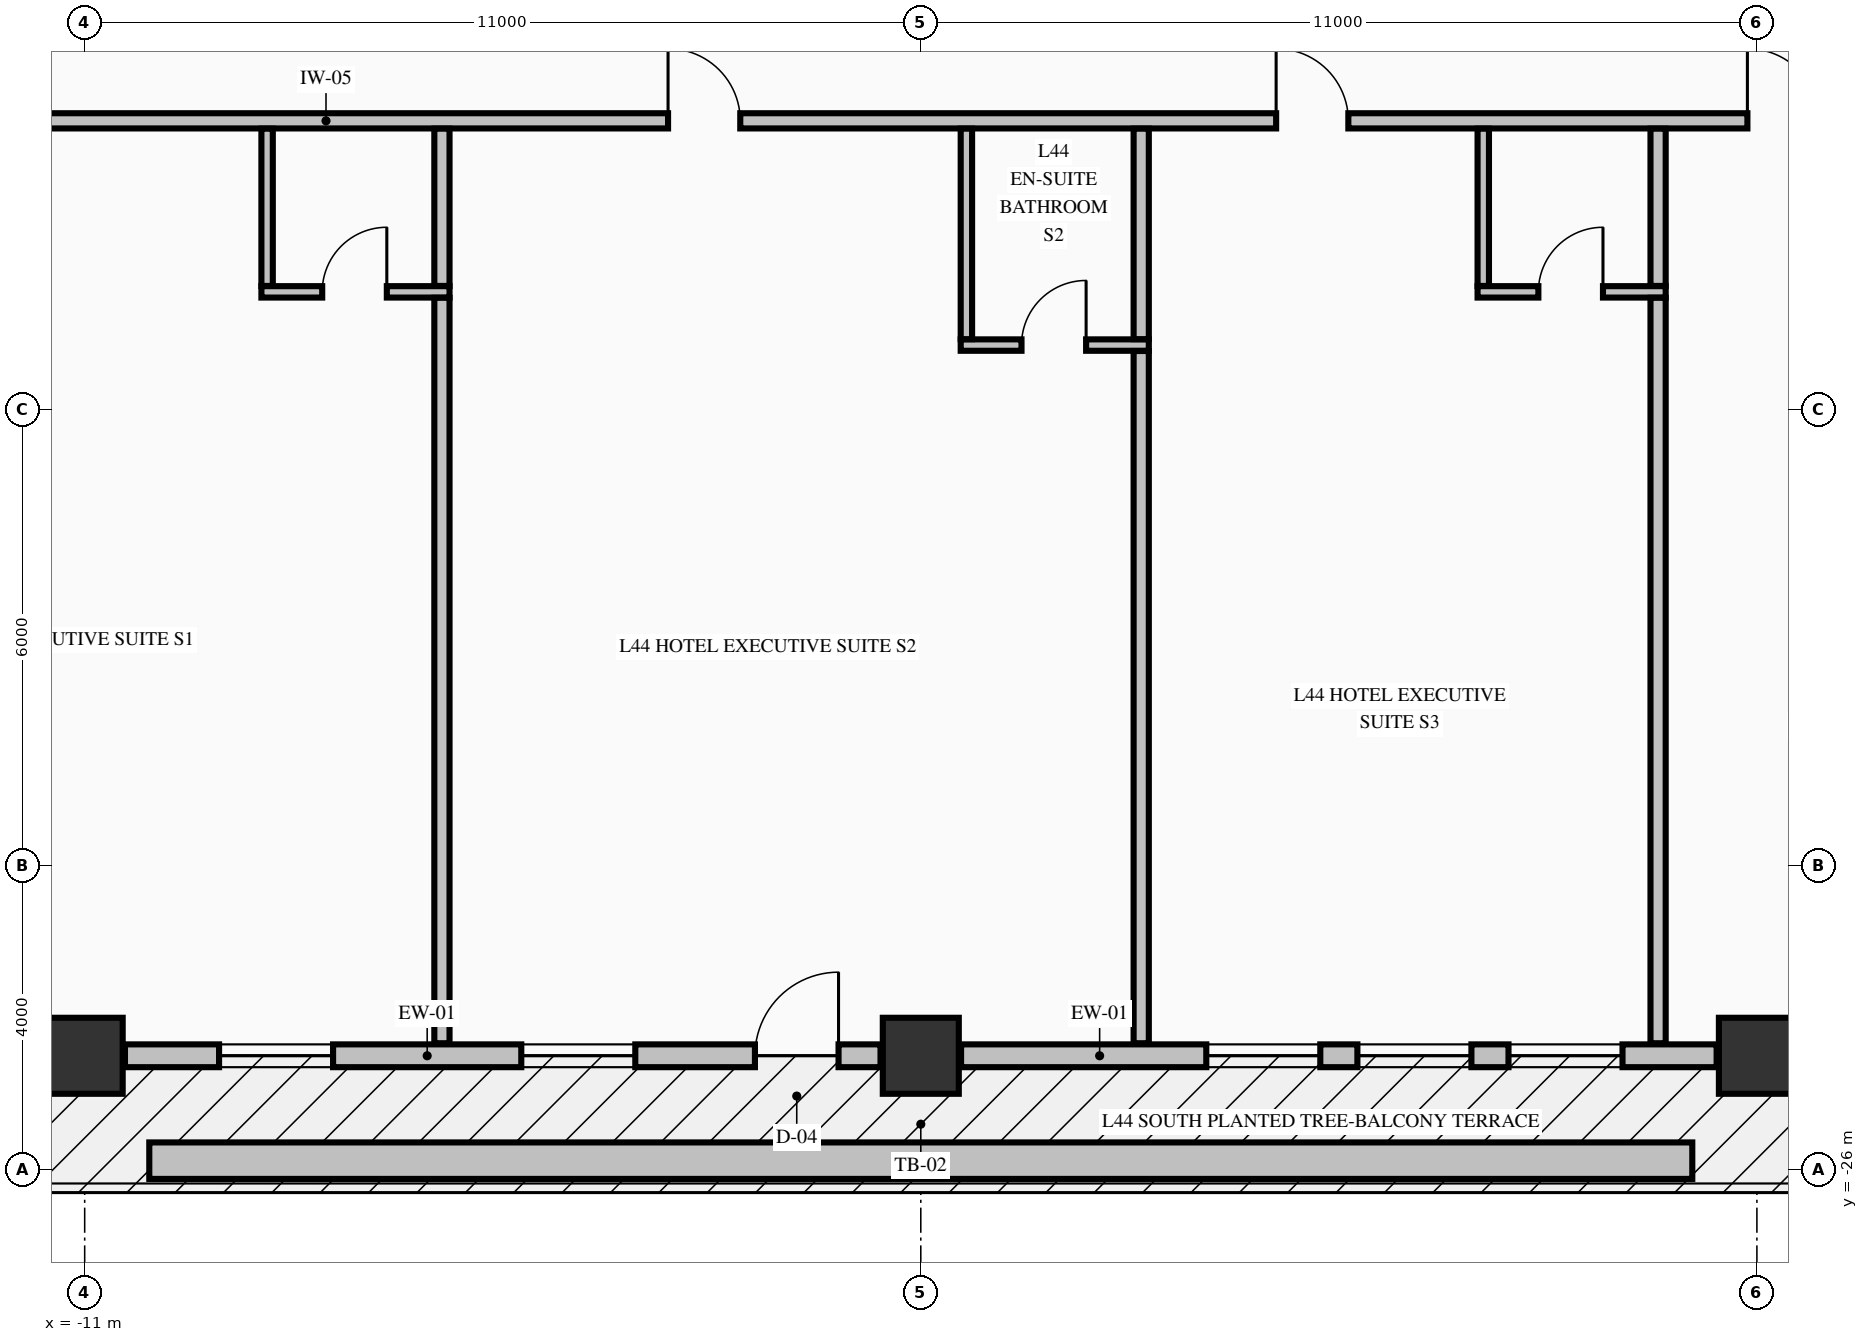
"""IFC4 building model, lengths in metres.
Left out: names, types, materials, properties, quantities, classifications, styles, units other than length and angle.
Written with IfcOpenShell. Run it as: python <this file> out.ifc"""

import sys

from ifc_helpers import new_model, si_unit, direction, frame, frame_2d, origin, origin_2d, place, context, subcontext, project, spatial, rectangle, extrude, element, fill, save


model = new_model("IFC4")
c1 = context("Model", 3, precision=1e-05, world=origin(), true_north=direction((0.0, 1.0)))
c2 = subcontext(c1, "Body", "Model", "MODEL_VIEW")
j1 = project(units=[si_unit("LENGTHUNIT", "METRE"), si_unit("PLANEANGLEUNIT", "RADIAN")], contexts=[c1])
p1 = place(None, origin())
s1 = spatial("IfcSite", under=j1, at=p1, CompositionType="ELEMENT")
p2 = place(p1, origin())
s2 = spatial("IfcBuilding", under=s1, at=p2, CompositionType="ELEMENT")
p3 = place(p2, frame((0.0, 0.0, 172.86)))
s3 = spatial("IfcBuildingStorey", under=s2, at=p3, CompositionType="ELEMENT", Elevation=172.86)
for number, where, z_axis, x_axis in (
    (1, (-11.0, -24.5, -0.25), (0.0, 0.0, 1.0), (1.0, 0.0, 0.0)),
    (2, (0.0, -24.5, -0.25), (0.0, 0.0, 1.0), (1.0, 0.0, 0.0)),
    (3, (11.0, -24.5, -0.25), (0.0, 0.0, 1.0), (1.0, 0.0, 0.0)),
):
    element("IfcColumn", number, at=place(p3, frame(where, z_axis=z_axis, x_axis=x_axis)), inside=s3, PredefinedType="COLUMN", context=c2, shape_type="SweptSolid", body=[
        extrude(rectangle(XDim=1.0, YDim=1.0, at=origin_2d()), origin(), (0.0, 0.0, 1.0), 3.375),
    ])
p4 = place(p3, frame((-10.47, -24.5, 0.0), z_axis=(0.0, 0.0, 1.0), x_axis=(1.0, 0.0, 0.0)))
e4 = element("IfcWall", 4, at=p4, inside=s3, PredefinedType="STANDARD", context=c2, shape_type="SweptSolid", body=[
    extrude(rectangle(XDim=9.94, YDim=0.3, at=frame_2d((4.97, 0.0))), origin(), (0.0, 0.0, 1.0), 2.517),
])
p5 = place(p4, frame((8.288, 0.0, 0.0)))
e5 = element("IfcOpeningElement", 5, at=p5, cuts=e4, PredefinedType="OPENING", context=c2, shape_type="SweptSolid", body=[
    extrude(rectangle(XDim=1.1, YDim=2.15, at=frame_2d((0.55, 1.075))), frame((0.0, 0.16, 0.0), z_axis=(0.0, -1.0, 0.0), x_axis=(1.0, 0.0, 0.0)), (0.0, 0.0, 1.0), 0.32),
])
p6 = place(p4, frame((1.238, 0.0, 0.72)))
e6 = element("IfcOpeningElement", 6, at=p6, cuts=e4, PredefinedType="OPENING", context=c2, shape_type="SweptSolid", body=[
    extrude(rectangle(XDim=1.5, YDim=1.6, at=frame_2d((0.75, 0.8))), frame((0.0, 0.16, 0.0), z_axis=(0.0, -1.0, 0.0), x_axis=(1.0, 0.0, 0.0)), (0.0, 0.0, 1.0), 0.32),
])
p7 = place(p4, frame((5.214, 0.0, 0.72)))
e7 = element("IfcOpeningElement", 7, at=p7, cuts=e4, PredefinedType="OPENING", context=c2, shape_type="SweptSolid", body=[
    extrude(rectangle(XDim=1.5, YDim=1.6, at=frame_2d((0.75, 0.8))), frame((0.0, 0.16, 0.0), z_axis=(0.0, -1.0, 0.0), x_axis=(1.0, 0.0, 0.0)), (0.0, 0.0, 1.0), 0.32),
])
p8 = place(p3, frame((0.53, -24.5, 0.0), z_axis=(0.0, 0.0, 1.0), x_axis=(1.0, 0.0, 0.0)))
e8 = element("IfcWall", 8, at=p8, inside=s3, PredefinedType="STANDARD", context=c2, shape_type="SweptSolid", body=[
    extrude(rectangle(XDim=9.94, YDim=0.3, at=frame_2d((4.97, 0.0))), origin(), (0.0, 0.0, 1.0), 2.517),
])
p9 = place(p8, frame((3.226, 0.0, 0.72)))
e9 = element("IfcOpeningElement", 9, at=p9, cuts=e8, PredefinedType="OPENING", context=c2, shape_type="SweptSolid", body=[
    extrude(rectangle(XDim=1.5, YDim=1.6, at=frame_2d((0.75, 0.8))), frame((0.0, 0.16, 0.0), z_axis=(0.0, -1.0, 0.0), x_axis=(1.0, 0.0, 0.0)), (0.0, 0.0, 1.0), 0.32),
])
p10 = place(p8, frame((5.214, 0.0, 0.72)))
e10 = element("IfcOpeningElement", 10, at=p10, cuts=e8, PredefinedType="OPENING", context=c2, shape_type="SweptSolid", body=[
    extrude(rectangle(XDim=1.5, YDim=1.6, at=frame_2d((0.75, 0.8))), frame((0.0, 0.16, 0.0), z_axis=(0.0, -1.0, 0.0), x_axis=(1.0, 0.0, 0.0)), (0.0, 0.0, 1.0), 0.32),
])
p11 = place(p8, frame((7.202, 0.0, 0.72)))
e11 = element("IfcOpeningElement", 11, at=p11, cuts=e8, PredefinedType="OPENING", context=c2, shape_type="SweptSolid", body=[
    extrude(rectangle(XDim=1.5, YDim=1.6, at=frame_2d((0.75, 0.8))), frame((0.0, 0.16, 0.0), z_axis=(0.0, -1.0, 0.0), x_axis=(1.0, 0.0, 0.0)), (0.0, 0.0, 1.0), 0.32),
])
p12 = place(p3, frame((0.525, -15.15, 0.0), z_axis=(0.0, 0.0, 1.0), x_axis=(1.0, 0.0, 0.0)))
e12 = element("IfcWall", 12, at=p12, inside=s3, PredefinedType="PARTITIONING", context=c2, shape_type="SweptSolid", body=[
    extrude(rectangle(XDim=2.475, YDim=0.15, at=frame_2d((1.238, 0.0))), origin(), (0.0, 0.0, 1.0), 3.125),
])
p13 = place(p12, frame((0.8, 0.0, 0.0)))
e13 = element("IfcOpeningElement", 13, at=p13, cuts=e12, PredefinedType="OPENING", context=c2, shape_type="SweptSolid", body=[
    extrude(rectangle(XDim=0.85, YDim=2.1, at=frame_2d((0.425, 1.05))), frame((0.0, 0.085, 0.0), z_axis=(0.0, -1.0, 0.0), x_axis=(1.0, 0.0, 0.0)), (0.0, 0.0, 1.0), 0.17),
])
p14 = place(p3, frame((-8.675, -14.45, 0.0), z_axis=(0.0, 0.0, 1.0), x_axis=(1.0, 0.0, 0.0)))
e14 = element("IfcWall", 14, at=p14, inside=s3, PredefinedType="PARTITIONING", context=c2, shape_type="SweptSolid", body=[
    extrude(rectangle(XDim=2.475, YDim=0.15, at=frame_2d((1.238, 0.0))), origin(), (0.0, 0.0, 1.0), 2.665),
])
p15 = place(p14, frame((0.8, 0.0, 0.0)))
e15 = element("IfcOpeningElement", 15, at=p15, cuts=e14, PredefinedType="OPENING", context=c2, shape_type="SweptSolid", body=[
    extrude(rectangle(XDim=0.85, YDim=2.1, at=frame_2d((0.425, 1.05))), frame((0.0, 0.085, 0.0), z_axis=(0.0, -1.0, 0.0), x_axis=(1.0, 0.0, 0.0)), (0.0, 0.0, 1.0), 0.17),
])
p16 = place(p3, frame((7.325, -14.45, 0.0), z_axis=(0.0, 0.0, 1.0), x_axis=(1.0, 0.0, 0.0)))
e16 = element("IfcWall", 16, at=p16, inside=s3, PredefinedType="PARTITIONING", context=c2, shape_type="SweptSolid", body=[
    extrude(rectangle(XDim=2.475, YDim=0.15, at=frame_2d((1.238, 0.0))), origin(), (0.0, 0.0, 1.0), 2.665),
])
p17 = place(p16, frame((0.8, 0.0, 0.0)))
e17 = element("IfcOpeningElement", 17, at=p17, cuts=e16, PredefinedType="OPENING", context=c2, shape_type="SweptSolid", body=[
    extrude(rectangle(XDim=0.85, YDim=2.1, at=frame_2d((0.425, 1.05))), frame((0.0, 0.085, 0.0), z_axis=(0.0, -1.0, 0.0), x_axis=(1.0, 0.0, 0.0)), (0.0, 0.0, 1.0), 0.17),
])
p18 = place(p3, frame((-17.1, -12.2, 0.0), z_axis=(0.0, 0.0, 1.0), x_axis=(1.0, 0.0, 0.0)))
e18 = element("IfcWall", 18, at=p18, inside=s3, PredefinedType="PARTITIONING", context=c2, shape_type="SweptSolid", body=[
    extrude(rectangle(XDim=39.2, YDim=0.2, at=frame_2d((19.6, 0.0))), origin(), (0.0, 0.0, 1.0), 3.125),
])
p19 = place(p18, frame((3.825, 0.0, 0.0)))
e19 = element("IfcOpeningElement", 19, at=p19, cuts=e18, PredefinedType="OPENING", context=c2, shape_type="SweptSolid", body=[
    extrude(rectangle(XDim=0.95, YDim=2.15, at=frame_2d((0.475, 1.075))), frame((0.0, 0.11, 0.0), z_axis=(0.0, -1.0, 0.0), x_axis=(1.0, 0.0, 0.0)), (0.0, 0.0, 1.0), 0.22),
])
p20 = place(p18, frame((13.775, 0.0, 0.0)))
e20 = element("IfcOpeningElement", 20, at=p20, cuts=e18, PredefinedType="OPENING", context=c2, shape_type="SweptSolid", body=[
    extrude(rectangle(XDim=0.95, YDim=2.15, at=frame_2d((0.475, 1.075))), frame((0.0, 0.11, 0.0), z_axis=(0.0, -1.0, 0.0), x_axis=(1.0, 0.0, 0.0)), (0.0, 0.0, 1.0), 0.22),
])
p21 = place(p18, frame((21.775, 0.0, 0.0)))
e21 = element("IfcOpeningElement", 21, at=p21, cuts=e18, PredefinedType="OPENING", context=c2, shape_type="SweptSolid", body=[
    extrude(rectangle(XDim=0.95, YDim=2.15, at=frame_2d((0.475, 1.075))), frame((0.0, 0.11, 0.0), z_axis=(0.0, -1.0, 0.0), x_axis=(1.0, 0.0, 0.0)), (0.0, 0.0, 1.0), 0.22),
])
p22 = place(p18, frame((27.975, 0.0, 0.0)))
e22 = element("IfcOpeningElement", 22, at=p22, cuts=e18, PredefinedType="OPENING", context=c2, shape_type="SweptSolid", body=[
    extrude(rectangle(XDim=0.95, YDim=2.15, at=frame_2d((0.475, 1.075))), frame((0.0, 0.11, 0.0), z_axis=(0.0, -1.0, 0.0), x_axis=(1.0, 0.0, 0.0)), (0.0, 0.0, 1.0), 0.22),
])
p23 = place(p18, frame((34.325, 0.0, 0.0)))
e23 = element("IfcOpeningElement", 23, at=p23, cuts=e18, PredefinedType="OPENING", context=c2, shape_type="SweptSolid", body=[
    extrude(rectangle(XDim=0.95, YDim=2.15, at=frame_2d((0.475, 1.075))), frame((0.0, 0.11, 0.0), z_axis=(0.0, -1.0, 0.0), x_axis=(1.0, 0.0, 0.0)), (0.0, 0.0, 1.0), 0.22),
])
p24 = place(p3, frame((-8.6, -14.372, 0.0), z_axis=(0.0, 0.0, 1.0), x_axis=(0.0, 1.0, 0.0)))
e24 = element("IfcWall", 24, at=p24, inside=s3, PredefinedType="PARTITIONING", context=c2, shape_type="SweptSolid", body=[
    extrude(rectangle(XDim=2.069, YDim=0.15, at=frame_2d((1.035, 0.0))), origin(), (0.0, 0.0, 1.0), 3.125),
])
p25 = place(p3, frame((-6.3, -24.335, 0.0), z_axis=(0.0, 0.0, 1.0), x_axis=(0.0, 1.0, 0.0)))
e25 = element("IfcWall", 25, at=p25, inside=s3, PredefinedType="PARTITIONING", context=c2, shape_type="SweptSolid", body=[
    extrude(rectangle(XDim=9.807, YDim=0.2, at=frame_2d((4.903, 0.0))), origin(), (0.0, 0.0, 1.0), 3.125),
])
p26 = place(p3, frame((-6.3, -14.372, 0.0), z_axis=(0.0, 0.0, 1.0), x_axis=(0.0, 1.0, 0.0)))
e26 = element("IfcWall", 26, at=p26, inside=s3, PredefinedType="PARTITIONING", context=c2, shape_type="SweptSolid", body=[
    extrude(rectangle(XDim=2.069, YDim=0.2, at=frame_2d((1.035, 0.0))), origin(), (0.0, 0.0, 1.0), 3.125),
])
p27 = place(p3, frame((0.6, -15.072, 0.0), z_axis=(0.0, 0.0, 1.0), x_axis=(0.0, 1.0, 0.0)))
e27 = element("IfcWall", 27, at=p27, inside=s3, PredefinedType="PARTITIONING", context=c2, shape_type="SweptSolid", body=[
    extrude(rectangle(XDim=2.769, YDim=0.15, at=frame_2d((1.385, 0.0))), origin(), (0.0, 0.0, 1.0), 3.125),
])
p28 = place(p3, frame((2.9, -24.335, 0.0), z_axis=(0.0, 0.0, 1.0), x_axis=(0.0, 1.0, 0.0)))
e28 = element("IfcWall", 28, at=p28, inside=s3, PredefinedType="PARTITIONING", context=c2, shape_type="SweptSolid", body=[
    extrude(rectangle(XDim=9.107, YDim=0.2, at=frame_2d((4.553, 0.0))), origin(), (0.0, 0.0, 1.0), 3.125),
])
p29 = place(p3, frame((2.9, -15.072, 0.0), z_axis=(0.0, 0.0, 1.0), x_axis=(0.0, 1.0, 0.0)))
e29 = element("IfcWall", 29, at=p29, inside=s3, PredefinedType="PARTITIONING", context=c2, shape_type="SweptSolid", body=[
    extrude(rectangle(XDim=2.769, YDim=0.2, at=frame_2d((1.385, 0.0))), origin(), (0.0, 0.0, 1.0), 3.125),
])
p30 = place(p3, frame((7.4, -14.372, 0.0), z_axis=(0.0, 0.0, 1.0), x_axis=(0.0, 1.0, 0.0)))
e30 = element("IfcWall", 30, at=p30, inside=s3, PredefinedType="PARTITIONING", context=c2, shape_type="SweptSolid", body=[
    extrude(rectangle(XDim=2.069, YDim=0.15, at=frame_2d((1.035, 0.0))), origin(), (0.0, 0.0, 1.0), 3.125),
])
p31 = place(p3, frame((9.7, -24.335, 0.0), z_axis=(0.0, 0.0, 1.0), x_axis=(0.0, 1.0, 0.0)))
e31 = element("IfcWall", 31, at=p31, inside=s3, PredefinedType="PARTITIONING", context=c2, shape_type="SweptSolid", body=[
    extrude(rectangle(XDim=9.807, YDim=0.2, at=frame_2d((4.903, 0.0))), origin(), (0.0, 0.0, 1.0), 3.125),
])
p32 = place(p3, frame((9.7, -14.372, 0.0), z_axis=(0.0, 0.0, 1.0), x_axis=(0.0, 1.0, 0.0)))
e32 = element("IfcWall", 32, at=p32, inside=s3, PredefinedType="PARTITIONING", context=c2, shape_type="SweptSolid", body=[
    extrude(rectangle(XDim=2.069, YDim=0.2, at=frame_2d((1.035, 0.0))), origin(), (0.0, 0.0, 1.0), 3.125),
])
p33 = place(p3, frame((-10.15, -25.88, -0.04), z_axis=(0.0, 0.0, 1.0), x_axis=(1.0, 0.0, 0.0)))
e33 = element("IfcWall", 33, at=p33, inside=s3, PredefinedType="PARAPET", context=c2, shape_type="SweptSolid", body=[
    extrude(rectangle(XDim=20.3, YDim=0.48, at=frame_2d((10.15, 0.0))), origin(), (0.0, 0.0, 1.0), 0.52),
])
p34 = place(p5, origin())
e34 = element("IfcDoor", 34, at=p34, inside=s3, OperationType="SINGLE_SWING_RIGHT", PredefinedType="DOOR", context=c2, shape_type="SweptSolid", body=[
    extrude(rectangle(XDim=1.1, YDim=2.15, at=frame_2d((0.55, 1.075))), frame((0.0, 0.025, 0.0), z_axis=(0.0, -1.0, 0.0), x_axis=(1.0, 0.0, 0.0)), (0.0, 0.0, 1.0), 0.05),
])
fill(e5, e34)
p35 = place(p6, origin())
e35 = element("IfcWindow", 35, at=p35, inside=s3, PartitioningType="SINGLE_PANEL", PredefinedType="WINDOW", context=c2, shape_type="SweptSolid", body=[
    extrude(rectangle(XDim=1.5, YDim=1.6, at=frame_2d((0.75, 0.8))), frame((0.0, 0.03, 0.0), z_axis=(0.0, -1.0, 0.0), x_axis=(1.0, 0.0, 0.0)), (0.0, 0.0, 1.0), 0.06),
])
fill(e6, e35)
p36 = place(p7, origin())
e36 = element("IfcWindow", 36, at=p36, inside=s3, PartitioningType="SINGLE_PANEL", PredefinedType="WINDOW", context=c2, shape_type="SweptSolid", body=[
    extrude(rectangle(XDim=1.5, YDim=1.6, at=frame_2d((0.75, 0.8))), frame((0.0, 0.03, 0.0), z_axis=(0.0, -1.0, 0.0), x_axis=(1.0, 0.0, 0.0)), (0.0, 0.0, 1.0), 0.06),
])
fill(e7, e36)
p37 = place(p9, origin())
e37 = element("IfcWindow", 37, at=p37, inside=s3, PartitioningType="SINGLE_PANEL", PredefinedType="WINDOW", context=c2, shape_type="SweptSolid", body=[
    extrude(rectangle(XDim=1.5, YDim=1.6, at=frame_2d((0.75, 0.8))), frame((0.0, 0.03, 0.0), z_axis=(0.0, -1.0, 0.0), x_axis=(1.0, 0.0, 0.0)), (0.0, 0.0, 1.0), 0.06),
])
fill(e9, e37)
p38 = place(p10, origin())
e38 = element("IfcWindow", 38, at=p38, inside=s3, PartitioningType="SINGLE_PANEL", PredefinedType="WINDOW", context=c2, shape_type="SweptSolid", body=[
    extrude(rectangle(XDim=1.5, YDim=1.6, at=frame_2d((0.75, 0.8))), frame((0.0, 0.03, 0.0), z_axis=(0.0, -1.0, 0.0), x_axis=(1.0, 0.0, 0.0)), (0.0, 0.0, 1.0), 0.06),
])
fill(e10, e38)
p39 = place(p11, origin())
e39 = element("IfcWindow", 39, at=p39, inside=s3, PartitioningType="SINGLE_PANEL", PredefinedType="WINDOW", context=c2, shape_type="SweptSolid", body=[
    extrude(rectangle(XDim=1.5, YDim=1.6, at=frame_2d((0.75, 0.8))), frame((0.0, 0.03, 0.0), z_axis=(0.0, -1.0, 0.0), x_axis=(1.0, 0.0, 0.0)), (0.0, 0.0, 1.0), 0.06),
])
fill(e11, e39)
p40 = place(p15, origin())
e40 = element("IfcDoor", 40, at=p40, inside=s3, OperationType="SINGLE_SWING_RIGHT", PredefinedType="DOOR", context=c2, shape_type="SweptSolid", body=[
    extrude(rectangle(XDim=0.85, YDim=2.1, at=frame_2d((0.425, 1.05))), frame((0.0, 0.025, 0.0), z_axis=(0.0, -1.0, 0.0), x_axis=(1.0, 0.0, 0.0)), (0.0, 0.0, 1.0), 0.05),
])
fill(e15, e40)
p41 = place(p20, origin())
e41 = element("IfcDoor", 41, at=p41, inside=s3, OperationType="SINGLE_SWING_LEFT", PredefinedType="DOOR", context=c2, shape_type="SweptSolid", body=[
    extrude(rectangle(XDim=0.95, YDim=2.15, at=frame_2d((0.475, 1.075))), frame((0.0, 0.025, 0.0), z_axis=(0.0, -1.0, 0.0), x_axis=(1.0, 0.0, 0.0)), (0.0, 0.0, 1.0), 0.05),
])
fill(e20, e41)
p42 = place(p13, origin())
e42 = element("IfcDoor", 42, at=p42, inside=s3, OperationType="SINGLE_SWING_RIGHT", PredefinedType="DOOR", context=c2, shape_type="SweptSolid", body=[
    extrude(rectangle(XDim=0.85, YDim=2.1, at=frame_2d((0.425, 1.05))), frame((0.0, 0.025, 0.0), z_axis=(0.0, -1.0, 0.0), x_axis=(1.0, 0.0, 0.0)), (0.0, 0.0, 1.0), 0.05),
])
fill(e13, e42)
p43 = place(p21, origin())
e43 = element("IfcDoor", 43, at=p43, inside=s3, OperationType="SINGLE_SWING_LEFT", PredefinedType="DOOR", context=c2, shape_type="SweptSolid", body=[
    extrude(rectangle(XDim=0.95, YDim=2.15, at=frame_2d((0.475, 1.075))), frame((0.0, 0.025, 0.0), z_axis=(0.0, -1.0, 0.0), x_axis=(1.0, 0.0, 0.0)), (0.0, 0.0, 1.0), 0.05),
])
fill(e21, e43)
p44 = place(p17, origin())
e44 = element("IfcDoor", 44, at=p44, inside=s3, OperationType="SINGLE_SWING_RIGHT", PredefinedType="DOOR", context=c2, shape_type="SweptSolid", body=[
    extrude(rectangle(XDim=0.85, YDim=2.1, at=frame_2d((0.425, 1.05))), frame((0.0, 0.025, 0.0), z_axis=(0.0, -1.0, 0.0), x_axis=(1.0, 0.0, 0.0)), (0.0, 0.0, 1.0), 0.05),
])
fill(e17, e44)
p45 = place(p22, origin())
e45 = element("IfcDoor", 45, at=p45, inside=s3, OperationType="SINGLE_SWING_LEFT", PredefinedType="DOOR", context=c2, shape_type="SweptSolid", body=[
    extrude(rectangle(XDim=0.95, YDim=2.15, at=frame_2d((0.475, 1.075))), frame((0.0, 0.025, 0.0), z_axis=(0.0, -1.0, 0.0), x_axis=(1.0, 0.0, 0.0)), (0.0, 0.0, 1.0), 0.05),
])
fill(e22, e45)
save(model, sys.argv[1])
